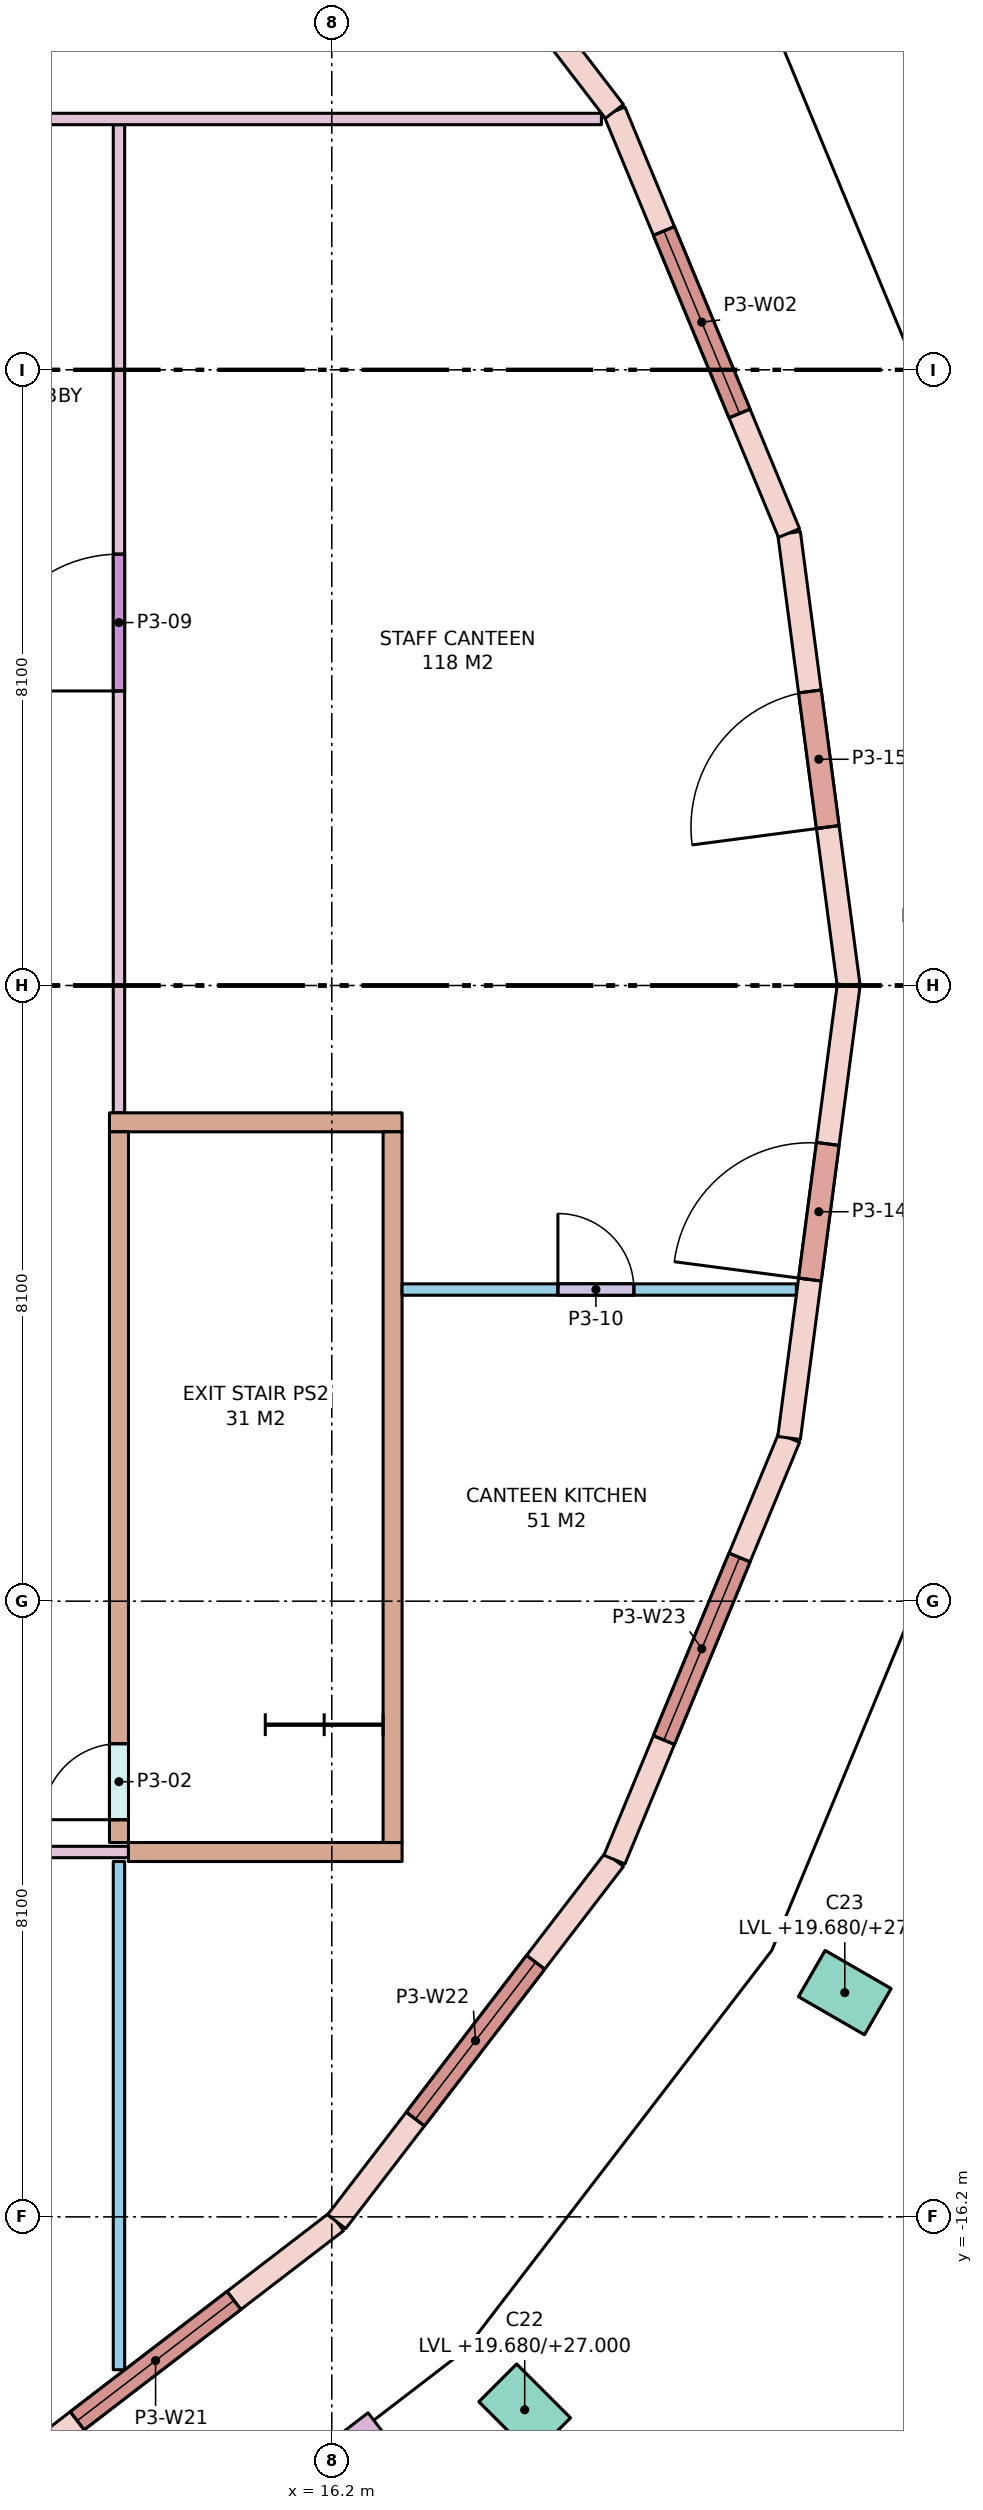
"""IFC4 building model, lengths in metres.
Left out: names, types, materials, properties, quantities, classifications, styles, units other than length and angle.
Written with IfcOpenShell. Run it as: python <this file> out.ifc"""

import sys

from ifc_helpers import new_model, si_unit, direction, frame, frame_2d, origin, origin_2d, place, context, subcontext, project, spatial, rectangle, extrude, element, fill, save


model = new_model("IFC4")
c1 = context("Model", 3, precision=1e-05, world=origin(), true_north=direction((0.0, 1.0)))
c2 = subcontext(c1, "Body", "Model", "MODEL_VIEW")
j1 = project(units=[si_unit("LENGTHUNIT", "METRE"), si_unit("PLANEANGLEUNIT", "RADIAN")], contexts=[c1])
p1 = place(None, origin())
s1 = spatial("IfcSite", under=j1, at=p1, CompositionType="ELEMENT")
p2 = place(p1, origin())
s2 = spatial("IfcBuilding", under=s1, at=p2, CompositionType="ELEMENT")
p3 = place(p2, frame((0.0, 0.0, 20.0)))
s3 = spatial("IfcBuildingStorey", under=s2, at=p3, CompositionType="ELEMENT", Elevation=20.0)
for number, where, z_axis, x_axis in (
    (1, (18.738, -18.738, -0.32), (0.0, 0.0, 1.0), (0.707, 0.707, 0.0)),
    (2, (22.95, -13.25, -0.32), (0.0, 0.0, 1.0), (0.5, 0.866, 0.0)),
):
    element("IfcColumn", number, at=place(p3, frame(where, z_axis=z_axis, x_axis=x_axis)), inside=s3, PredefinedType="COLUMN", context=c2, shape_type="SweptSolid", body=[
        extrude(rectangle(XDim=0.7, YDim=1.0, at=origin_2d()), origin(), (0.0, 0.0, 1.0), 7.32),
    ])
p4 = place(p3, frame((23.0, 0.0, 0.0), z_axis=(0.0, 0.0, 1.0), x_axis=(-0.130522880875, 0.991445297315, 0.0)))
e3 = element("IfcWall", 3, at=p4, inside=s3, PredefinedType="STANDARD", context=c2, shape_type="SweptSolid", body=[
    extrude(rectangle(XDim=6.004, YDim=0.3, at=frame_2d((3.002, 0.0))), origin(), (0.0, 0.0, 1.0), 6.72),
])
p5 = place(p4, frame((2.102, 0.0, 0.0)))
e4 = element("IfcOpeningElement", 4, at=p5, cuts=e3, PredefinedType="OPENING", context=c2, shape_type="SweptSolid", body=[
    extrude(rectangle(XDim=1.8, YDim=2.7, at=frame_2d((0.9, 1.35))), frame((0.0, 0.16, 0.0), z_axis=(0.0, -1.0, 0.0), x_axis=(1.0, 0.0, 0.0)), (0.0, 0.0, 1.0), 0.32),
])
p6 = place(p3, frame((22.216, 5.953, 0.0), z_axis=(0.0, 0.0, 1.0), x_axis=(-0.382671411433, 0.923884511653, 0.0)))
e5 = element("IfcWall", 5, at=p6, inside=s3, PredefinedType="STANDARD", context=c2, shape_type="SweptSolid", body=[
    extrude(rectangle(XDim=6.004, YDim=0.3, at=frame_2d((3.002, 0.0))), origin(), (0.0, 0.0, 1.0), 6.72),
])
p7 = place(p6, frame((1.702, 0.0, 0.8)))
e6 = element("IfcOpeningElement", 6, at=p7, cuts=e5, PredefinedType="OPENING", context=c2, shape_type="SweptSolid", body=[
    extrude(rectangle(XDim=2.6, YDim=5.4, at=frame_2d((1.3, 2.7))), frame((0.0, 0.16, 0.0), z_axis=(0.0, -1.0, 0.0), x_axis=(1.0, 0.0, 0.0)), (0.0, 0.0, 1.0), 0.32),
])
p8 = place(p3, frame((19.919, 11.5, 0.0), z_axis=(0.0, 0.0, 1.0), x_axis=(-0.608778912074, 0.793339924758, 0.0)))
e7 = element("IfcWall", 7, at=p8, inside=s3, PredefinedType="STANDARD", context=c2, shape_type="SweptSolid", body=[
    extrude(rectangle(XDim=6.004, YDim=0.3, at=frame_2d((3.002, 0.0))), origin(), (0.0, 0.0, 1.0), 6.72),
])
p9 = place(p8, frame((1.702, 0.0, 0.8)))
e8 = element("IfcOpeningElement", 8, at=p9, cuts=e7, PredefinedType="OPENING", context=c2, shape_type="SweptSolid", body=[
    extrude(rectangle(XDim=2.6, YDim=5.4, at=frame_2d((1.3, 2.7))), frame((0.0, 0.16, 0.0), z_axis=(0.0, -1.0, 0.0), x_axis=(1.0, 0.0, 0.0)), (0.0, 0.0, 1.0), 0.32),
])
p10 = place(p3, frame((11.5, -19.919, 0.0), z_axis=(0.0, 0.0, 1.0), x_axis=(0.793339924758, 0.608778912074, 0.0)))
e9 = element("IfcWall", 9, at=p10, inside=s3, PredefinedType="STANDARD", context=c2, shape_type="SweptSolid", body=[
    extrude(rectangle(XDim=6.004, YDim=0.3, at=frame_2d((3.002, 0.0))), origin(), (0.0, 0.0, 1.0), 6.72),
])
p11 = place(p10, frame((1.702, 0.0, 0.8)))
e10 = element("IfcOpeningElement", 10, at=p11, cuts=e9, PredefinedType="OPENING", context=c2, shape_type="SweptSolid", body=[
    extrude(rectangle(XDim=2.6, YDim=5.4, at=frame_2d((1.3, 2.7))), frame((0.0, 0.16, 0.0), z_axis=(0.0, -1.0, 0.0), x_axis=(1.0, 0.0, 0.0)), (0.0, 0.0, 1.0), 0.32),
])
p12 = place(p3, frame((16.263, -16.263, 0.0), z_axis=(0.0, 0.0, 1.0), x_axis=(0.608778912074, 0.793339924758, 0.0)))
e11 = element("IfcWall", 11, at=p12, inside=s3, PredefinedType="STANDARD", context=c2, shape_type="SweptSolid", body=[
    extrude(rectangle(XDim=6.004, YDim=0.3, at=frame_2d((3.002, 0.0))), origin(), (0.0, 0.0, 1.0), 6.72),
])
p13 = place(p12, frame((1.702, 0.0, 0.8)))
e12 = element("IfcOpeningElement", 12, at=p13, cuts=e11, PredefinedType="OPENING", context=c2, shape_type="SweptSolid", body=[
    extrude(rectangle(XDim=2.6, YDim=5.4, at=frame_2d((1.3, 2.7))), frame((0.0, 0.16, 0.0), z_axis=(0.0, -1.0, 0.0), x_axis=(1.0, 0.0, 0.0)), (0.0, 0.0, 1.0), 0.32),
])
p14 = place(p3, frame((19.919, -11.5, 0.0), z_axis=(0.0, 0.0, 1.0), x_axis=(0.382671411433, 0.923884511653, 0.0)))
e13 = element("IfcWall", 13, at=p14, inside=s3, PredefinedType="STANDARD", context=c2, shape_type="SweptSolid", body=[
    extrude(rectangle(XDim=6.004, YDim=0.3, at=frame_2d((3.002, 0.0))), origin(), (0.0, 0.0, 1.0), 6.72),
])
p15 = place(p14, frame((1.702, 0.0, 0.8)))
e14 = element("IfcOpeningElement", 14, at=p15, cuts=e13, PredefinedType="OPENING", context=c2, shape_type="SweptSolid", body=[
    extrude(rectangle(XDim=2.6, YDim=5.4, at=frame_2d((1.3, 2.7))), frame((0.0, 0.16, 0.0), z_axis=(0.0, -1.0, 0.0), x_axis=(1.0, 0.0, 0.0)), (0.0, 0.0, 1.0), 0.32),
])
p16 = place(p3, frame((22.216, -5.953, 0.0), z_axis=(0.0, 0.0, 1.0), x_axis=(0.130522880875, 0.991445297315, 0.0)))
e15 = element("IfcWall", 15, at=p16, inside=s3, PredefinedType="STANDARD", context=c2, shape_type="SweptSolid", body=[
    extrude(rectangle(XDim=6.004, YDim=0.3, at=frame_2d((3.002, 0.0))), origin(), (0.0, 0.0, 1.0), 6.72),
])
p17 = place(p16, frame((2.102, 0.0, 0.0)))
e16 = element("IfcOpeningElement", 16, at=p17, cuts=e15, PredefinedType="OPENING", context=c2, shape_type="SweptSolid", body=[
    extrude(rectangle(XDim=1.8, YDim=2.7, at=frame_2d((0.9, 1.35))), frame((0.0, 0.16, 0.0), z_axis=(0.0, -1.0, 0.0), x_axis=(1.0, 0.0, 0.0)), (0.0, 0.0, 1.0), 0.32),
])
p18 = place(p3, frame((13.974, -21.167, 0.0), z_axis=(0.0, 0.0, 1.0), x_axis=(0.793359599829, 0.608753271334, 0.0)))
e17 = element("IfcWall", 17, at=p18, inside=s3, PredefinedType="PARAPET", context=c2, shape_type="SweptSolid", body=[
    extrude(rectangle(XDim=3.6, YDim=0.5, at=frame_2d((1.8, 0.0))), origin(), (0.0, 0.0, 1.0), 0.9),
])
p19 = place(p3, frame((17.125, -4.0, 0.0), z_axis=(0.0, 0.0, 1.0), x_axis=(1.0, 0.0, 0.0)))
e18 = element("IfcWall", 18, at=p19, inside=s3, PredefinedType="PARTITIONING", context=c2, shape_type="SweptSolid", body=[
    extrude(rectangle(XDim=5.187, YDim=0.15, at=frame_2d((2.594, 0.0))), origin(), (0.0, 0.0, 1.0), 6.72),
])
p20 = place(p19, frame((2.05, 0.0, 0.0)))
e19 = element("IfcOpeningElement", 19, at=p20, cuts=e18, PredefinedType="OPENING", context=c2, shape_type="SweptSolid", body=[
    extrude(rectangle(XDim=1.0, YDim=2.1, at=frame_2d((0.5, 1.05))), frame((0.0, 0.085, 0.0), z_axis=(0.0, -1.0, 0.0), x_axis=(1.0, 0.0, 0.0)), (0.0, 0.0, 1.0), 0.17),
])
p21 = place(p3, frame((13.275, -1.8, 0.0), z_axis=(0.0, 0.0, 1.0), x_axis=(1.0, 0.0, 0.0)))
e20 = element("IfcWall", 20, at=p21, inside=s3, PredefinedType="STANDARD", context=c2, shape_type="SweptSolid", body=[
    extrude(rectangle(XDim=3.85, YDim=0.25, at=frame_2d((1.925, 0.0))), origin(), (0.0, 0.0, 1.0), 6.72),
])
p22 = place(p3, frame((13.4, -1.675, 0.0), z_axis=(0.0, 0.0, 1.0), x_axis=(0.0, 1.0, 0.0)))
e21 = element("IfcWall", 21, at=p22, inside=s3, PredefinedType="PARTITIONING", context=c2, shape_type="SweptSolid", body=[
    extrude(rectangle(XDim=13.0, YDim=0.15, at=frame_2d((6.5, 0.0))), origin(), (0.0, 0.0, 1.0), 6.72),
])
p23 = place(p22, frame((5.55, 0.0, 0.0)))
e22 = element("IfcOpeningElement", 22, at=p23, cuts=e21, PredefinedType="OPENING", context=c2, shape_type="SweptSolid", body=[
    extrude(rectangle(XDim=1.8, YDim=2.4, at=frame_2d((0.9, 1.2))), frame((0.0, 0.085, 0.0), z_axis=(0.0, -1.0, 0.0), x_axis=(1.0, 0.0, 0.0)), (0.0, 0.0, 1.0), 0.17),
])
p24 = place(p3, frame((13.525, -11.4, 0.0), z_axis=(0.0, 0.0, 1.0), x_axis=(1.0, 0.0, 0.0)))
e23 = element("IfcWall", 23, at=p24, inside=s3, PredefinedType="STANDARD", context=c2, shape_type="SweptSolid", body=[
    extrude(rectangle(XDim=3.6, YDim=0.25, at=frame_2d((1.8, 0.0))), origin(), (0.0, 0.0, 1.0), 6.72),
])
p25 = place(p3, frame((17.0, -11.275, 0.0), z_axis=(0.0, 0.0, 1.0), x_axis=(0.0, 1.0, 0.0)))
e24 = element("IfcWall", 24, at=p25, inside=s3, PredefinedType="STANDARD", context=c2, shape_type="SweptSolid", body=[
    extrude(rectangle(XDim=9.35, YDim=0.25, at=frame_2d((4.675, 0.0))), origin(), (0.0, 0.0, 1.0), 6.72),
])
p26 = place(p3, frame((13.4, -18.212, 0.0), z_axis=(0.0, 0.0, 1.0), x_axis=(0.0, 1.0, 0.0)))
e25 = element("IfcWall", 25, at=p26, inside=s3, PredefinedType="PARTITIONING", context=c2, shape_type="SweptSolid", body=[
    extrude(rectangle(XDim=6.687, YDim=0.15, at=frame_2d((3.343, 0.0))), origin(), (0.0, 0.0, 1.0), 6.72),
])
p27 = place(p3, frame((2.725, 11.4, 0.0), z_axis=(0.0, 0.0, 1.0), x_axis=(1.0, 0.0, 0.0)))
e26 = element("IfcWall", 26, at=p27, inside=s3, PredefinedType="PARTITIONING", context=c2, shape_type="SweptSolid", body=[
    extrude(rectangle(XDim=17.022, YDim=0.15, at=frame_2d((8.511, 0.0))), origin(), (0.0, 0.0, 1.0), 6.72),
])
p28 = place(p27, frame((4.45, 0.0, 0.0)))
e27 = element("IfcOpeningElement", 27, at=p28, cuts=e26, PredefinedType="OPENING", context=c2, shape_type="SweptSolid", body=[
    extrude(rectangle(XDim=1.8, YDim=2.4, at=frame_2d((0.9, 1.2))), frame((0.0, 0.085, 0.0), z_axis=(0.0, -1.0, 0.0), x_axis=(1.0, 0.0, 0.0)), (0.0, 0.0, 1.0), 0.17),
])
p29 = place(p3, frame((13.4, -11.275, 0.0), z_axis=(0.0, 0.0, 1.0), x_axis=(0.0, 1.0, 0.0)))
e28 = element("IfcWall", 28, at=p29, inside=s3, PredefinedType="STANDARD", context=c2, shape_type="SweptSolid", body=[
    extrude(rectangle(XDim=9.35, YDim=0.25, at=frame_2d((4.675, 0.0))), origin(), (0.0, 0.0, 1.0), 6.72),
])
p30 = place(p29, frame((0.3, 0.0, 0.0)))
e29 = element("IfcOpeningElement", 29, at=p30, cuts=e28, PredefinedType="OPENING", context=c2, shape_type="SweptSolid", body=[
    extrude(rectangle(XDim=1.0, YDim=2.1, at=frame_2d((0.5, 1.05))), frame((0.0, 0.135, 0.0), z_axis=(0.0, -1.0, 0.0), x_axis=(1.0, 0.0, 0.0)), (0.0, 0.0, 1.0), 0.27),
])
p31 = place(p3, frame((2.125, -11.4, 0.0), z_axis=(0.0, 0.0, 1.0), x_axis=(1.0, 0.0, 0.0)))
e30 = element("IfcWall", 30, at=p31, inside=s3, PredefinedType="PARTITIONING", context=c2, shape_type="SweptSolid", body=[
    extrude(rectangle(XDim=11.4, YDim=0.15, at=frame_2d((5.7, 0.0))), origin(), (0.0, 0.0, 1.0), 6.72),
])
p32 = place(p31, frame((5.15, 0.0, 0.0)))
e31 = element("IfcOpeningElement", 31, at=p32, cuts=e30, PredefinedType="OPENING", context=c2, shape_type="SweptSolid", body=[
    extrude(rectangle(XDim=1.0, YDim=2.1, at=frame_2d((0.5, 1.05))), frame((0.0, 0.085, 0.0), z_axis=(0.0, -1.0, 0.0), x_axis=(1.0, 0.0, 0.0)), (0.0, 0.0, 1.0), 0.17),
])
p33 = place(p7, origin())
e32 = element("IfcWindow", 32, at=p33, inside=s3, PartitioningType="SINGLE_PANEL", PredefinedType="WINDOW", context=c2, shape_type="SweptSolid", body=[
    extrude(rectangle(XDim=2.6, YDim=5.4, at=frame_2d((1.3, 2.7))), frame((0.0, 0.03, 0.0), z_axis=(0.0, -1.0, 0.0), x_axis=(1.0, 0.0, 0.0)), (0.0, 0.0, 1.0), 0.06),
])
fill(e6, e32)
p34 = place(p11, origin())
e33 = element("IfcWindow", 33, at=p34, inside=s3, PartitioningType="SINGLE_PANEL", PredefinedType="WINDOW", context=c2, shape_type="SweptSolid", body=[
    extrude(rectangle(XDim=2.6, YDim=5.4, at=frame_2d((1.3, 2.7))), frame((0.0, 0.03, 0.0), z_axis=(0.0, -1.0, 0.0), x_axis=(1.0, 0.0, 0.0)), (0.0, 0.0, 1.0), 0.06),
])
fill(e10, e33)
p35 = place(p13, origin())
e34 = element("IfcWindow", 34, at=p35, inside=s3, PartitioningType="SINGLE_PANEL", PredefinedType="WINDOW", context=c2, shape_type="SweptSolid", body=[
    extrude(rectangle(XDim=2.6, YDim=5.4, at=frame_2d((1.3, 2.7))), frame((0.0, 0.03, 0.0), z_axis=(0.0, -1.0, 0.0), x_axis=(1.0, 0.0, 0.0)), (0.0, 0.0, 1.0), 0.06),
])
fill(e12, e34)
p36 = place(p15, origin())
e35 = element("IfcWindow", 35, at=p36, inside=s3, PartitioningType="SINGLE_PANEL", PredefinedType="WINDOW", context=c2, shape_type="SweptSolid", body=[
    extrude(rectangle(XDim=2.6, YDim=5.4, at=frame_2d((1.3, 2.7))), frame((0.0, 0.03, 0.0), z_axis=(0.0, -1.0, 0.0), x_axis=(1.0, 0.0, 0.0)), (0.0, 0.0, 1.0), 0.06),
])
fill(e14, e35)
p37 = place(p30, origin())
e36 = element("IfcDoor", 36, at=p37, inside=s3, OperationType="SINGLE_SWING_LEFT", PredefinedType="DOOR", context=c2, shape_type="SweptSolid", body=[
    extrude(rectangle(XDim=1.0, YDim=2.1, at=frame_2d((0.5, 1.05))), frame((0.0, 0.025, 0.0), z_axis=(0.0, -1.0, 0.0), x_axis=(1.0, 0.0, 0.0)), (0.0, 0.0, 1.0), 0.05),
])
fill(e29, e36)
p38 = place(p23, origin())
e37 = element("IfcDoor", 37, at=p38, inside=s3, OperationType="SINGLE_SWING_LEFT", PredefinedType="DOOR", context=c2, shape_type="SweptSolid", body=[
    extrude(rectangle(XDim=1.8, YDim=2.4, at=frame_2d((0.9, 1.2))), frame((0.0, 0.025, 0.0), z_axis=(0.0, -1.0, 0.0), x_axis=(1.0, 0.0, 0.0)), (0.0, 0.0, 1.0), 0.05),
])
fill(e22, e37)
p39 = place(p20, origin())
e38 = element("IfcDoor", 38, at=p39, inside=s3, OperationType="SINGLE_SWING_LEFT", PredefinedType="DOOR", context=c2, shape_type="SweptSolid", body=[
    extrude(rectangle(XDim=1.0, YDim=2.1, at=frame_2d((0.5, 1.05))), frame((0.0, 0.025, 0.0), z_axis=(0.0, -1.0, 0.0), x_axis=(1.0, 0.0, 0.0)), (0.0, 0.0, 1.0), 0.05),
])
fill(e19, e38)
p40 = place(p17, origin())
e39 = element("IfcDoor", 39, at=p40, inside=s3, OperationType="SINGLE_SWING_LEFT", PredefinedType="DOOR", context=c2, shape_type="SweptSolid", body=[
    extrude(rectangle(XDim=1.8, YDim=2.7, at=frame_2d((0.9, 1.35))), frame((0.0, 0.025, 0.0), z_axis=(0.0, -1.0, 0.0), x_axis=(1.0, 0.0, 0.0)), (0.0, 0.0, 1.0), 0.05),
])
fill(e16, e39)
p41 = place(p5, origin())
e40 = element("IfcDoor", 40, at=p41, inside=s3, OperationType="SINGLE_SWING_LEFT", PredefinedType="DOOR", context=c2, shape_type="SweptSolid", body=[
    extrude(rectangle(XDim=1.8, YDim=2.7, at=frame_2d((0.9, 1.35))), frame((0.0, 0.025, 0.0), z_axis=(0.0, -1.0, 0.0), x_axis=(1.0, 0.0, 0.0)), (0.0, 0.0, 1.0), 0.05),
])
fill(e4, e40)
save(model, sys.argv[1])
